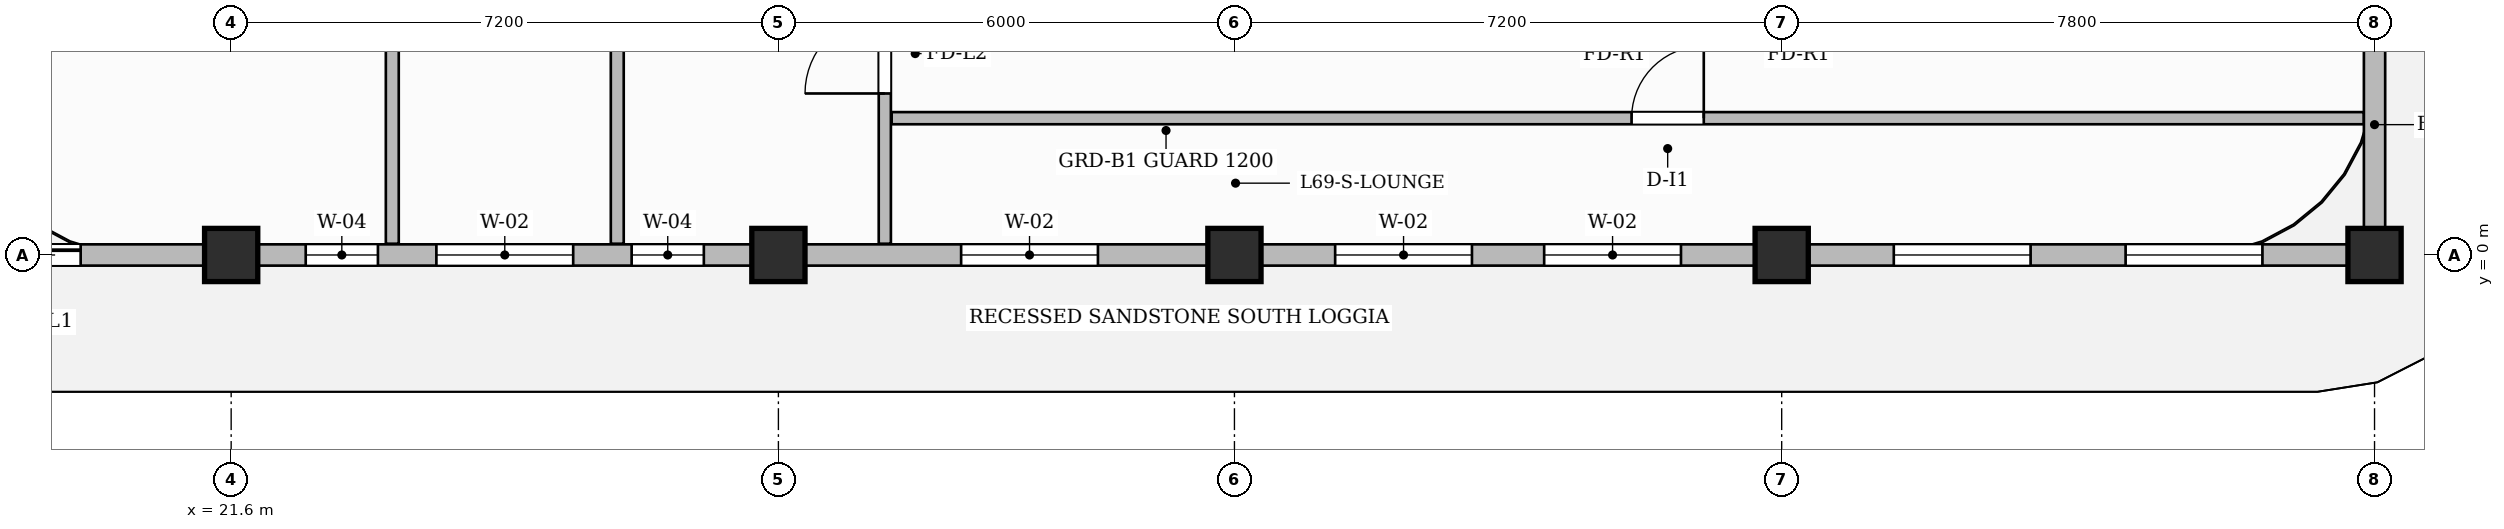
"""IFC4 building model, lengths in metres.
Left out: names, types, materials, properties, quantities, classifications, styles, units other than length and angle.
Written with IfcOpenShell. Run it as: python <this file> out.ifc"""

import sys

from ifc_helpers import new_model, si_unit, direction, frame, frame_2d, origin, origin_2d, place, context, subcontext, project, spatial, rectangle, extrude, source, transform, mapped, element, fill, save


model = new_model("IFC4")
c1 = context("Model", 3, precision=1e-05, world=origin(), true_north=direction((0.0, 1.0)))
c2 = subcontext(c1, "Body", "Model", "MODEL_VIEW")
j1 = project(units=[si_unit("LENGTHUNIT", "METRE"), si_unit("PLANEANGLEUNIT", "RADIAN")], contexts=[c1])
p1 = place(None, origin())
s1 = spatial("IfcSite", under=j1, at=p1, CompositionType="ELEMENT")
p2 = place(p1, origin())
s2 = spatial("IfcBuilding", under=s1, at=p2, CompositionType="ELEMENT")
p3 = place(p2, frame((0.0, 0.0, 275.05)))
s3 = spatial("IfcBuildingStorey", under=s2, at=p3, CompositionType="ELEMENT", Elevation=275.05)
m1 = source(origin(), c2, "Body", "SweptSolid", [
    extrude(rectangle(XDim=0.7, YDim=0.7, at=origin_2d()), origin(), (0.0, 0.0, 1.0), 3.85),
])
for number, where, z_axis, x_axis in (
    (1, (21.6, 0.0, 0.0), (0.0, 0.0, 1.0), (1.0, 0.0, 0.0)),
    (2, (28.8, 0.0, 0.0), (0.0, 0.0, 1.0), (1.0, 0.0, 0.0)),
    (3, (34.8, 0.0, 0.0), (0.0, 0.0, 1.0), (1.0, 0.0, 0.0)),
    (4, (42.0, 0.0, 0.0), (0.0, 0.0, 1.0), (1.0, 0.0, 0.0)),
    (5, (49.8, 0.0, 0.0), (0.0, 0.0, 1.0), (1.0, 0.0, 0.0)),
):
    element("IfcColumn", number, at=place(p3, frame(where, z_axis=z_axis, x_axis=x_axis)), inside=s3, PredefinedType="COLUMN", context=c2, shape_type="MappedRepresentation", body=[
        mapped(m1, transform((0.0, 0.0, 0.0), scale=1.0)),
    ])
p4 = place(p3, frame((30.2, 0.148, 0.0), z_axis=(0.0, 0.0, 1.0), x_axis=(0.0, 1.0, 0.0)))
e6 = element("IfcWall", 6, at=p4, inside=s3, PredefinedType="PARTITIONING", context=c2, shape_type="SweptSolid", body=[
    extrude(rectangle(XDim=9.712, YDim=0.16, at=frame_2d((4.856, 0.0))), origin(), (0.0, 0.0, 1.0), 3.6),
])
p5 = place(p4, frame((1.977, 0.0, 0.0)))
e7 = element("IfcOpeningElement", 7, at=p5, cuts=e6, PredefinedType="OPENING", context=c2, shape_type="SweptSolid", body=[
    extrude(rectangle(XDim=1.05, YDim=2.15, at=frame_2d((0.525, 1.075))), frame((0.0, 0.09, 0.0), z_axis=(0.0, -1.0, 0.0), x_axis=(1.0, 0.0, 0.0)), (0.0, 0.0, 1.0), 0.18),
])
p6 = place(p3, frame((30.29, 1.8, 0.0), z_axis=(0.0, 0.0, 1.0), x_axis=(1.0, 0.0, 0.0)))
e8 = element("IfcWall", 8, at=p6, inside=s3, PredefinedType="PARTITIONING", context=c2, shape_type="SweptSolid", body=[
    extrude(rectangle(XDim=19.37, YDim=0.16, at=frame_2d((9.685, 0.0))), origin(), (0.0, 0.0, 1.0), 3.6),
])
p7 = place(p6, frame((9.735, 0.0, 0.0)))
e9 = element("IfcOpeningElement", 9, at=p7, cuts=e8, PredefinedType="OPENING", context=c2, shape_type="SweptSolid", body=[
    extrude(rectangle(XDim=0.95, YDim=2.15, at=frame_2d((0.475, 1.075))), frame((0.0, 0.09, 0.0), z_axis=(0.0, -1.0, 0.0), x_axis=(1.0, 0.0, 0.0)), (0.0, 0.0, 1.0), 0.18),
])
for number, where, z_axis, x_axis in (
    (10, (23.72, 0.148, 0.0), (0.0, 0.0, 1.0), (0.0, 1.0, 0.0)),
    (11, (26.68, 0.148, 0.0), (0.0, 0.0, 1.0), (0.0, 1.0, 0.0)),
):
    element("IfcWall", number, at=place(p3, frame(where, z_axis=z_axis, x_axis=x_axis)), inside=s3, PredefinedType="PARTITIONING", context=c2, shape_type="SweptSolid", body=[
        extrude(rectangle(XDim=9.712, YDim=0.17, at=frame_2d((4.856, 0.0))), origin(), (0.0, 0.0, 1.0), 3.6),
    ])
p8 = place(p3, frame((18.0, 0.0, 0.0), z_axis=(0.0, 0.0, 1.0), x_axis=(1.0, 0.0, 0.0)))
e12 = element("IfcWall", 12, at=p8, inside=s3, PredefinedType="SOLIDWALL", context=c2, shape_type="SweptSolid", body=[
    extrude(rectangle(XDim=31.8, YDim=0.28, at=frame_2d((15.9, 0.0))), origin(), (0.0, 0.0, 1.0), 3.185),
])
p9 = place(p8, frame((0.42, 0.0, 0.0)))
e13 = element("IfcOpeningElement", 13, at=p9, cuts=e12, PredefinedType="OPENING", context=c2, shape_type="SweptSolid", body=[
    extrude(rectangle(XDim=1.2, YDim=2.2, at=frame_2d((0.6, 1.1))), frame((0.0, 0.15, 0.0), z_axis=(0.0, -1.0, 0.0), x_axis=(1.0, 0.0, 0.0)), (0.0, 0.0, 1.0), 0.3),
])
p10 = place(p8, frame((4.581, 0.0, 0.8)))
e14 = element("IfcOpeningElement", 14, at=p10, cuts=e12, PredefinedType="OPENING", context=c2, shape_type="SweptSolid", body=[
    extrude(rectangle(XDim=0.95, YDim=1.75, at=frame_2d((0.475, 0.875))), frame((0.0, 0.15, 0.0), z_axis=(0.0, -1.0, 0.0), x_axis=(1.0, 0.0, 0.0)), (0.0, 0.0, 1.0), 0.3),
])
p11 = place(p8, frame((6.3, 0.0, 0.8)))
e15 = element("IfcOpeningElement", 15, at=p11, cuts=e12, PredefinedType="OPENING", context=c2, shape_type="SweptSolid", body=[
    extrude(rectangle(XDim=1.8, YDim=1.85, at=frame_2d((0.9, 0.925))), frame((0.0, 0.15, 0.0), z_axis=(0.0, -1.0, 0.0), x_axis=(1.0, 0.0, 0.0)), (0.0, 0.0, 1.0), 0.3),
])
p12 = place(p8, frame((8.869, 0.0, 0.8)))
e16 = element("IfcOpeningElement", 16, at=p12, cuts=e12, PredefinedType="OPENING", context=c2, shape_type="SweptSolid", body=[
    extrude(rectangle(XDim=0.95, YDim=1.75, at=frame_2d((0.475, 0.875))), frame((0.0, 0.15, 0.0), z_axis=(0.0, -1.0, 0.0), x_axis=(1.0, 0.0, 0.0)), (0.0, 0.0, 1.0), 0.3),
])
p13 = place(p8, frame((13.204, 0.0, 0.8)))
e17 = element("IfcOpeningElement", 17, at=p13, cuts=e12, PredefinedType="OPENING", context=c2, shape_type="SweptSolid", body=[
    extrude(rectangle(XDim=1.8, YDim=1.85, at=frame_2d((0.9, 0.925))), frame((0.0, 0.15, 0.0), z_axis=(0.0, -1.0, 0.0), x_axis=(1.0, 0.0, 0.0)), (0.0, 0.0, 1.0), 0.3),
])
p14 = place(p8, frame((18.125, 0.0, 0.8)))
e18 = element("IfcOpeningElement", 18, at=p14, cuts=e12, PredefinedType="OPENING", context=c2, shape_type="SweptSolid", body=[
    extrude(rectangle(XDim=1.8, YDim=1.85, at=frame_2d((0.9, 0.925))), frame((0.0, 0.15, 0.0), z_axis=(0.0, -1.0, 0.0), x_axis=(1.0, 0.0, 0.0)), (0.0, 0.0, 1.0), 0.3),
])
p15 = place(p8, frame((20.875, 0.0, 0.8)))
e19 = element("IfcOpeningElement", 19, at=p15, cuts=e12, PredefinedType="OPENING", context=c2, shape_type="SweptSolid", body=[
    extrude(rectangle(XDim=1.8, YDim=1.85, at=frame_2d((0.9, 0.925))), frame((0.0, 0.15, 0.0), z_axis=(0.0, -1.0, 0.0), x_axis=(1.0, 0.0, 0.0)), (0.0, 0.0, 1.0), 0.3),
])
p16 = place(p8, frame((25.475, 0.0, 0.8)))
e20 = element("IfcOpeningElement", 20, at=p16, cuts=e12, PredefinedType="OPENING", context=c2, shape_type="SweptSolid", body=[
    extrude(rectangle(XDim=1.8, YDim=1.85, at=frame_2d((0.9, 0.925))), frame((0.0, 0.15, 0.0), z_axis=(0.0, -1.0, 0.0), x_axis=(1.0, 0.0, 0.0)), (0.0, 0.0, 1.0), 0.3),
])
p17 = place(p8, frame((28.525, 0.0, 0.8)))
e21 = element("IfcOpeningElement", 21, at=p17, cuts=e12, PredefinedType="OPENING", context=c2, shape_type="SweptSolid", body=[
    extrude(rectangle(XDim=1.8, YDim=1.85, at=frame_2d((0.9, 0.925))), frame((0.0, 0.15, 0.0), z_axis=(0.0, -1.0, 0.0), x_axis=(1.0, 0.0, 0.0)), (0.0, 0.0, 1.0), 0.3),
])
p18 = place(p3, frame((49.8, 0.05, 0.0), z_axis=(0.0, 0.0, 1.0), x_axis=(0.0, 1.0, 0.0)))
e22 = element("IfcWall", 22, at=p18, inside=s3, PredefinedType="SOLIDWALL", context=c2, shape_type="SweptSolid", body=[
    extrude(rectangle(XDim=3.33, YDim=0.28, at=frame_2d((1.665, 0.0))), origin(), (0.0, 0.0, 1.0), 3.6),
])
m2 = source(origin(), c2, "Body", "SweptSolid", [
    extrude(rectangle(XDim=1.05, YDim=2.15, at=frame_2d((0.525, 1.075))), frame((0.0, 0.025, 0.0), z_axis=(0.0, -1.0, 0.0), x_axis=(1.0, 0.0, 0.0)), (0.0, 0.0, 1.0), 0.05),
])
p19 = place(p5, origin())
e23 = element("IfcDoor", 23, at=p19, inside=s3, OperationType="SINGLE_SWING_LEFT", PredefinedType="DOOR", context=c2, shape_type="MappedRepresentation", body=[
    mapped(m2, transform((0.0, 0.0, 0.0), scale=1.0)),
])
fill(e7, e23)
m3 = source(origin(), c2, "Body", "SweptSolid", [
    extrude(rectangle(XDim=0.95, YDim=2.15, at=frame_2d((0.475, 1.075))), frame((0.0, 0.025, 0.0), z_axis=(0.0, -1.0, 0.0), x_axis=(1.0, 0.0, 0.0)), (0.0, 0.0, 1.0), 0.05),
])
p20 = place(p7, origin())
e24 = element("IfcDoor", 24, at=p20, inside=s3, OperationType="SINGLE_SWING_RIGHT", PredefinedType="DOOR", context=c2, shape_type="MappedRepresentation", body=[
    mapped(m3, transform((0.0, 0.0, 0.0), scale=1.0)),
])
fill(e9, e24)
m4 = source(origin(), c2, "Body", "SweptSolid", [
    extrude(rectangle(XDim=1.2, YDim=2.2, at=frame_2d((0.6, 1.1))), frame((0.0, 0.025, 0.0), z_axis=(0.0, -1.0, 0.0), x_axis=(1.0, 0.0, 0.0)), (0.0, 0.0, 1.0), 0.05),
])
p21 = place(p9, origin())
e25 = element("IfcDoor", 25, at=p21, inside=s3, OperationType="SLIDING_TO_LEFT", PredefinedType="DOOR", context=c2, shape_type="MappedRepresentation", body=[
    mapped(m4, transform((0.0, 0.0, 0.0), scale=1.0)),
])
fill(e13, e25)
m5 = source(origin(), c2, "Body", "SweptSolid", [
    extrude(rectangle(XDim=0.95, YDim=1.75, at=frame_2d((0.475, 0.875))), frame((0.0, 0.03, 0.0), z_axis=(0.0, -1.0, 0.0), x_axis=(1.0, 0.0, 0.0)), (0.0, 0.0, 1.0), 0.06),
])
p22 = place(p10, origin())
e26 = element("IfcWindow", 26, at=p22, inside=s3, PartitioningType="SINGLE_PANEL", PredefinedType="WINDOW", context=c2, shape_type="MappedRepresentation", body=[
    mapped(m5, transform((0.0, 0.0, 0.0), scale=1.0)),
])
fill(e14, e26)
m6 = source(origin(), c2, "Body", "SweptSolid", [
    extrude(rectangle(XDim=1.8, YDim=1.85, at=frame_2d((0.9, 0.925))), frame((0.0, 0.03, 0.0), z_axis=(0.0, -1.0, 0.0), x_axis=(1.0, 0.0, 0.0)), (0.0, 0.0, 1.0), 0.06),
])
p23 = place(p11, origin())
e27 = element("IfcWindow", 27, at=p23, inside=s3, PartitioningType="DOUBLE_PANEL_VERTICAL", PredefinedType="WINDOW", context=c2, shape_type="MappedRepresentation", body=[
    mapped(m6, transform((0.0, 0.0, 0.0), scale=1.0)),
])
fill(e15, e27)
p24 = place(p12, origin())
e28 = element("IfcWindow", 28, at=p24, inside=s3, PartitioningType="SINGLE_PANEL", PredefinedType="WINDOW", context=c2, shape_type="MappedRepresentation", body=[
    mapped(m5, transform((0.0, 0.0, 0.0), scale=1.0)),
])
fill(e16, e28)
p25 = place(p13, origin())
e29 = element("IfcWindow", 29, at=p25, inside=s3, PartitioningType="DOUBLE_PANEL_VERTICAL", PredefinedType="WINDOW", context=c2, shape_type="MappedRepresentation", body=[
    mapped(m6, transform((0.0, 0.0, 0.0), scale=1.0)),
])
fill(e17, e29)
p26 = place(p14, origin())
e30 = element("IfcWindow", 30, at=p26, inside=s3, PartitioningType="DOUBLE_PANEL_VERTICAL", PredefinedType="WINDOW", context=c2, shape_type="MappedRepresentation", body=[
    mapped(m6, transform((0.0, 0.0, 0.0), scale=1.0)),
])
fill(e18, e30)
p27 = place(p15, origin())
e31 = element("IfcWindow", 31, at=p27, inside=s3, PartitioningType="DOUBLE_PANEL_VERTICAL", PredefinedType="WINDOW", context=c2, shape_type="MappedRepresentation", body=[
    mapped(m6, transform((0.0, 0.0, 0.0), scale=1.0)),
])
fill(e19, e31)
p28 = place(p16, origin())
e32 = element("IfcWindow", 32, at=p28, inside=s3, PartitioningType="DOUBLE_PANEL_VERTICAL", PredefinedType="WINDOW", context=c2, shape_type="MappedRepresentation", body=[
    mapped(m6, transform((0.0, 0.0, 0.0), scale=1.0)),
])
fill(e20, e32)
p29 = place(p17, origin())
e33 = element("IfcWindow", 33, at=p29, inside=s3, PartitioningType="DOUBLE_PANEL_VERTICAL", PredefinedType="WINDOW", context=c2, shape_type="MappedRepresentation", body=[
    mapped(m6, transform((0.0, 0.0, 0.0), scale=1.0)),
])
fill(e21, e33)
save(model, sys.argv[1])
